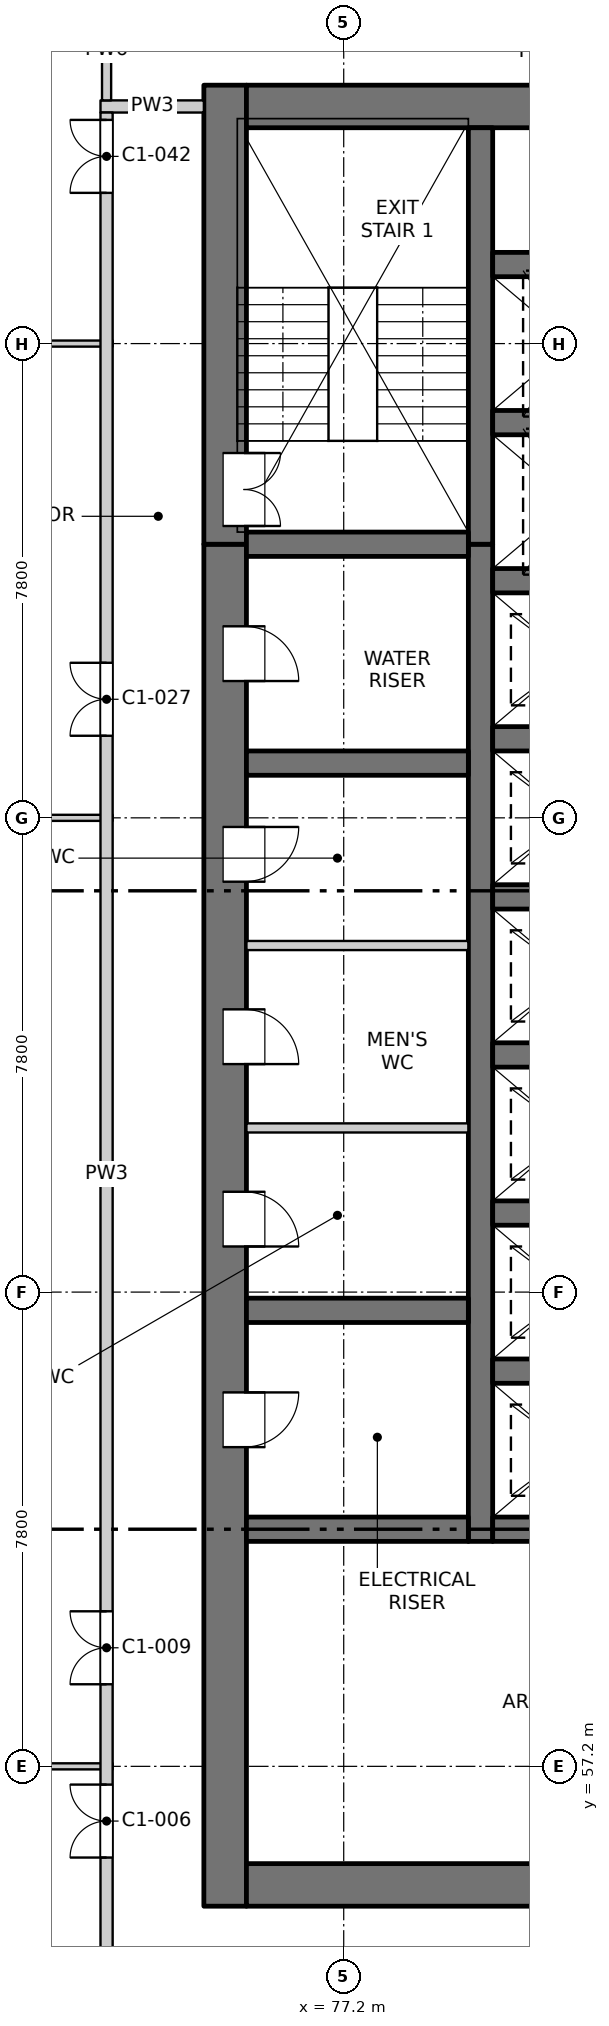
"""IFC4 building model, lengths in metres.
Left out: names, types, materials, properties, quantities, classifications, styles, units other than length and angle.
Written with IfcOpenShell. Run it as: python <this file> out.ifc"""

import sys

from ifc_helpers import new_model, si_unit, direction, frame, frame_2d, origin, place, context, subcontext, project, spatial, rectangle, extrude, element, fill, save


model = new_model("IFC4")
c1 = context("Model", 3, precision=1e-05, world=origin(), true_north=direction((0.0, 1.0)))
c2 = subcontext(c1, "Body", "Model", "MODEL_VIEW")
j1 = project(units=[si_unit("LENGTHUNIT", "METRE"), si_unit("PLANEANGLEUNIT", "RADIAN")], contexts=[c1])
p1 = place(None, origin())
s1 = spatial("IfcSite", under=j1, at=p1, CompositionType="ELEMENT")
p2 = place(p1, origin())
s2 = spatial("IfcBuilding", under=s1, at=p2, CompositionType="ELEMENT")
p3 = place(p2, frame((0.0, 0.0, 71.6)))
s3 = spatial("IfcBuildingStorey", under=s2, at=p3, CompositionType="ELEMENT", Elevation=71.6)
p4 = place(p3, frame((75.25, 54.9, -0.25), z_axis=(0.0, 0.0, 1.0), x_axis=(0.0, 1.0, 0.0)))
e1 = element("IfcWall", 1, at=p4, inside=s3, PredefinedType="SOLIDWALL", context=c2, shape_type="SweptSolid", body=[
    extrude(rectangle(XDim=22.4, YDim=0.7, at=frame_2d((11.2, 0.0))), origin(), (0.0, 0.0, 1.0), 3.4),
])
p5 = place(p4, frame((7.55, 0.0, 0.25)))
e2 = element("IfcOpeningElement", 2, at=p5, cuts=e1, PredefinedType="OPENING", context=c2, shape_type="SweptSolid", body=[
    extrude(rectangle(XDim=0.9, YDim=2.1, at=frame_2d((0.45, 1.05))), frame((0.0, 0.36, 0.0), z_axis=(0.0, -1.0, 0.0), x_axis=(1.0, 0.0, 0.0)), (0.0, 0.0, 1.0), 0.72),
])
p6 = place(p4, frame((10.85, 0.0, 0.25)))
e3 = element("IfcOpeningElement", 3, at=p6, cuts=e1, PredefinedType="OPENING", context=c2, shape_type="SweptSolid", body=[
    extrude(rectangle(XDim=0.9, YDim=2.1, at=frame_2d((0.45, 1.05))), frame((0.0, 0.36, 0.0), z_axis=(0.0, -1.0, 0.0), x_axis=(1.0, 0.0, 0.0)), (0.0, 0.0, 1.0), 0.72),
])
p7 = place(p4, frame((13.85, 0.0, 0.25)))
e4 = element("IfcOpeningElement", 4, at=p7, cuts=e1, PredefinedType="OPENING", context=c2, shape_type="SweptSolid", body=[
    extrude(rectangle(XDim=0.9, YDim=2.1, at=frame_2d((0.45, 1.05))), frame((0.0, 0.36, 0.0), z_axis=(0.0, -1.0, 0.0), x_axis=(1.0, 0.0, 0.0)), (0.0, 0.0, 1.0), 0.72),
])
p8 = place(p4, frame((16.85, 0.0, 0.25)))
e5 = element("IfcOpeningElement", 5, at=p8, cuts=e1, PredefinedType="OPENING", context=c2, shape_type="SweptSolid", body=[
    extrude(rectangle(XDim=0.9, YDim=2.1, at=frame_2d((0.45, 1.05))), frame((0.0, 0.36, 0.0), z_axis=(0.0, -1.0, 0.0), x_axis=(1.0, 0.0, 0.0)), (0.0, 0.0, 1.0), 0.72),
])
p9 = place(p4, frame((20.15, 0.0, 0.25)))
e6 = element("IfcOpeningElement", 6, at=p9, cuts=e1, PredefinedType="OPENING", context=c2, shape_type="SweptSolid", body=[
    extrude(rectangle(XDim=0.9, YDim=2.1, at=frame_2d((0.45, 1.05))), frame((0.0, 0.36, 0.0), z_axis=(0.0, -1.0, 0.0), x_axis=(1.0, 0.0, 0.0)), (0.0, 0.0, 1.0), 0.72),
])
p10 = place(p3, frame((75.25, 77.3, -0.25), z_axis=(0.0, 0.0, 1.0), x_axis=(0.0, 1.0, 0.0)))
e7 = element("IfcWall", 7, at=p10, inside=s3, PredefinedType="SOLIDWALL", context=c2, shape_type="SweptSolid", body=[
    extrude(rectangle(XDim=7.55, YDim=0.7, at=frame_2d((3.775, 0.0))), origin(), (0.0, 0.0, 1.0), 3.4),
])
p11 = place(p10, frame((0.3, 0.0, 0.25)))
e8 = element("IfcOpeningElement", 8, at=p11, cuts=e7, PredefinedType="OPENING", context=c2, shape_type="SweptSolid", body=[
    extrude(rectangle(XDim=1.2, YDim=2.1, at=frame_2d((0.6, 1.05))), frame((0.0, 0.36, 0.0), z_axis=(0.0, -1.0, 0.0), x_axis=(1.0, 0.0, 0.0)), (0.0, 0.0, 1.0), 0.72),
])
p12 = place(p3, frame((75.6, 55.25, -0.25), z_axis=(0.0, 0.0, 1.0), x_axis=(1.0, 0.0, 0.0)))
e9 = element("IfcWall", 9, at=p12, inside=s3, PredefinedType="SOLIDWALL", context=c2, shape_type="SweptSolid", body=[
    extrude(rectangle(XDim=18.8, YDim=0.7, at=frame_2d((9.4, 0.0))), origin(), (0.0, 0.0, 1.0), 3.4),
])
p13 = place(p12, frame((8.65, 0.0, 0.25)))
e10 = element("IfcOpeningElement", 10, at=p13, cuts=e9, PredefinedType="OPENING", context=c2, shape_type="SweptSolid", body=[
    extrude(rectangle(XDim=1.5, YDim=2.1, at=frame_2d((0.75, 1.05))), frame((0.0, 0.36, 0.0), z_axis=(0.0, -1.0, 0.0), x_axis=(1.0, 0.0, 0.0)), (0.0, 0.0, 1.0), 0.72),
])
p14 = place(p3, frame((75.6, 84.5, -0.25), z_axis=(0.0, 0.0, 1.0), x_axis=(1.0, 0.0, 0.0)))
e11 = element("IfcWall", 11, at=p14, inside=s3, PredefinedType="SOLIDWALL", context=c2, shape_type="SweptSolid", body=[
    extrude(rectangle(XDim=18.8, YDim=0.7, at=frame_2d((9.4, 0.0))), origin(), (0.0, 0.0, 1.0), 3.4),
])
p15 = place(p3, frame((79.45, 60.9, -0.25), z_axis=(0.0, 0.0, 1.0), x_axis=(0.0, 1.0, 0.0)))
e12 = element("IfcWall", 12, at=p15, inside=s3, PredefinedType="SOLIDWALL", context=c2, shape_type="SweptSolid", body=[
    extrude(rectangle(XDim=16.4, YDim=0.4, at=frame_2d((8.2, 0.0))), origin(), (0.0, 0.0, 1.0), 3.4),
])
p16 = place(p3, frame((79.45, 77.3, -0.25), z_axis=(0.0, 0.0, 1.0), x_axis=(0.0, 1.0, 0.0)))
e13 = element("IfcWall", 13, at=p16, inside=s3, PredefinedType="SOLIDWALL", context=c2, shape_type="SweptSolid", body=[
    extrude(rectangle(XDim=6.85, YDim=0.4, at=frame_2d((3.425, 0.0))), origin(), (0.0, 0.0, 1.0), 3.4),
])
for number, where, z_axis, x_axis in (
    (14, (79.65, 61.1, -0.25), (0.0, 0.0, 1.0), (1.0, 0.0, 0.0)),
    (15, (79.65, 63.7, -0.25), (0.0, 0.0, 1.0), (1.0, 0.0, 0.0)),
    (16, (79.65, 66.3, -0.25), (0.0, 0.0, 1.0), (1.0, 0.0, 0.0)),
    (17, (79.65, 68.9, -0.25), (0.0, 0.0, 1.0), (1.0, 0.0, 0.0)),
    (18, (79.65, 71.5, -0.25), (0.0, 0.0, 1.0), (1.0, 0.0, 0.0)),
    (19, (79.65, 74.1, -0.25), (0.0, 0.0, 1.0), (1.0, 0.0, 0.0)),
    (20, (79.65, 76.7, -0.25), (0.0, 0.0, 1.0), (1.0, 0.0, 0.0)),
    (21, (79.65, 79.3, -0.25), (0.0, 0.0, 1.0), (1.0, 0.0, 0.0)),
    (22, (79.65, 81.9, -0.25), (0.0, 0.0, 1.0), (1.0, 0.0, 0.0)),
):
    element("IfcWall", number, at=place(p3, frame(where, z_axis=z_axis, x_axis=x_axis)), inside=s3, PredefinedType="SOLIDWALL", context=c2, shape_type="SweptSolid", body=[
        extrude(rectangle(XDim=3.0, YDim=0.4, at=frame_2d((1.5, 0.0))), origin(), (0.0, 0.0, 1.0), 3.4),
    ])
for number, where, z_axis, x_axis in (
    (23, (75.6, 61.1, -0.25), (0.0, 0.0, 1.0), (1.0, 0.0, 0.0)),
    (24, (75.6, 64.7, -0.25), (0.0, 0.0, 1.0), (1.0, 0.0, 0.0)),
    (25, (75.6, 73.7, -0.25), (0.0, 0.0, 1.0), (1.0, 0.0, 0.0)),
    (26, (75.6, 77.3, -0.25), (0.0, 0.0, 1.0), (1.0, 0.0, 0.0)),
):
    element("IfcWall", number, at=place(p3, frame(where, z_axis=z_axis, x_axis=x_axis)), inside=s3, PredefinedType="SOLIDWALL", context=c2, shape_type="SweptSolid", body=[
        extrude(rectangle(XDim=3.65, YDim=0.4, at=frame_2d((1.825, 0.0))), origin(), (0.0, 0.0, 1.0), 3.4),
    ])
p17 = place(p3, frame((69.4, 57.2, 0.0), z_axis=(0.0, 0.0, 1.0), x_axis=(1.0, 0.0, 0.0)))
e27 = element("IfcWall", 27, at=p17, inside=s3, PredefinedType="PARTITIONING", context=c2, shape_type="SweptSolid", body=[
    extrude(rectangle(XDim=4.0, YDim=0.1, at=frame_2d((2.0, 0.0))), origin(), (0.0, 0.0, 1.0), 3.15),
])
for number, where, z_axis, x_axis in (
    (28, (75.6, 67.7, 0.0), (0.0, 0.0, 1.0), (1.0, 0.0, 0.0)),
    (29, (75.6, 70.7, 0.0), (0.0, 0.0, 1.0), (1.0, 0.0, 0.0)),
):
    element("IfcWall", number, at=place(p3, frame(where, z_axis=z_axis, x_axis=x_axis)), inside=s3, PredefinedType="PARTITIONING", context=c2, shape_type="SweptSolid", body=[
        extrude(rectangle(XDim=3.65, YDim=0.15, at=frame_2d((1.825, 0.0))), origin(), (0.0, 0.0, 1.0), 3.15),
    ])
for number, where, z_axis, x_axis in (
    (30, (69.4, 72.8, 0.0), (0.0, 0.0, 1.0), (1.0, 0.0, 0.0)),
    (31, (69.4, 80.6, 0.0), (0.0, 0.0, 1.0), (1.0, 0.0, 0.0)),
):
    element("IfcWall", number, at=place(p3, frame(where, z_axis=z_axis, x_axis=x_axis)), inside=s3, PredefinedType="PARTITIONING", context=c2, shape_type="SweptSolid", body=[
        extrude(rectangle(XDim=4.0, YDim=0.1, at=frame_2d((2.0, 0.0))), origin(), (0.0, 0.0, 1.0), 3.15),
    ])
p18 = place(p3, frame((73.2, 84.5, 0.0), z_axis=(0.0, 0.0, 1.0), x_axis=(1.0, 0.0, 0.0)))
e32 = element("IfcWall", 32, at=p18, inside=s3, PredefinedType="PARTITIONING", context=c2, shape_type="SweptSolid", body=[
    extrude(rectangle(XDim=1.7, YDim=0.2, at=frame_2d((0.85, 0.0))), origin(), (0.0, 0.0, 1.0), 3.15),
])
p19 = place(p3, frame((73.3, 49.5, 0.0), z_axis=(0.0, 0.0, 1.0), x_axis=(0.0, 1.0, 0.0)))
e33 = element("IfcWall", 33, at=p19, inside=s3, PredefinedType="PARTITIONING", context=c2, shape_type="SweptSolid", body=[
    extrude(rectangle(XDim=34.9, YDim=0.2, at=frame_2d((17.45, 0.0))), origin(), (0.0, 0.0, 1.0), 3.15),
])
p20 = place(p19, frame((6.2, 0.0, 0.0)))
e34 = element("IfcOpeningElement", 34, at=p20, cuts=e33, PredefinedType="OPENING", context=c2, shape_type="SweptSolid", body=[
    extrude(rectangle(XDim=1.2, YDim=2.1, at=frame_2d((0.6, 1.05))), frame((0.0, 0.11, 0.0), z_axis=(0.0, -1.0, 0.0), x_axis=(1.0, 0.0, 0.0)), (0.0, 0.0, 1.0), 0.22),
])
p21 = place(p19, frame((9.05, 0.0, 0.0)))
e35 = element("IfcOpeningElement", 35, at=p21, cuts=e33, PredefinedType="OPENING", context=c2, shape_type="SweptSolid", body=[
    extrude(rectangle(XDim=1.2, YDim=2.1, at=frame_2d((0.6, 1.05))), frame((0.0, 0.11, 0.0), z_axis=(0.0, -1.0, 0.0), x_axis=(1.0, 0.0, 0.0)), (0.0, 0.0, 1.0), 0.22),
])
p22 = place(p19, frame((24.65, 0.0, 0.0)))
e36 = element("IfcOpeningElement", 36, at=p22, cuts=e33, PredefinedType="OPENING", context=c2, shape_type="SweptSolid", body=[
    extrude(rectangle(XDim=1.2, YDim=2.1, at=frame_2d((0.6, 1.05))), frame((0.0, 0.11, 0.0), z_axis=(0.0, -1.0, 0.0), x_axis=(1.0, 0.0, 0.0)), (0.0, 0.0, 1.0), 0.22),
])
p23 = place(p19, frame((33.579, 0.0, 0.0)))
e37 = element("IfcOpeningElement", 37, at=p23, cuts=e33, PredefinedType="OPENING", context=c2, shape_type="SweptSolid", body=[
    extrude(rectangle(XDim=1.2, YDim=2.1, at=frame_2d((0.6, 1.05))), frame((0.0, 0.11, 0.0), z_axis=(0.0, -1.0, 0.0), x_axis=(1.0, 0.0, 0.0)), (0.0, 0.0, 1.0), 0.22),
])
p24 = place(p3, frame((73.3, 84.6, 0.0), z_axis=(0.0, 0.0, 1.0), x_axis=(0.0, 1.0, 0.0)))
e38 = element("IfcWall", 38, at=p24, inside=s3, PredefinedType="PARTITIONING", context=c2, shape_type="SweptSolid", body=[
    extrude(rectangle(XDim=3.665, YDim=0.15, at=frame_2d((1.833, 0.0))), origin(), (0.0, 0.0, 1.0), 3.15),
])
p25 = place(p24, frame((1.25, 0.0, 0.0)))
e39 = element("IfcOpeningElement", 39, at=p25, cuts=e38, PredefinedType="OPENING", context=c2, shape_type="SweptSolid", body=[
    extrude(rectangle(XDim=1.2, YDim=2.1, at=frame_2d((0.6, 1.05))), frame((0.0, 0.085, 0.0), z_axis=(0.0, -1.0, 0.0), x_axis=(1.0, 0.0, 0.0)), (0.0, 0.0, 1.0), 0.17),
])
p26 = place(p20, origin())
e40 = element("IfcDoor", 40, at=p26, inside=s3, OperationType="DOUBLE_DOOR_SINGLE_SWING", PredefinedType="DOOR", context=c2, shape_type="SweptSolid", body=[
    extrude(rectangle(XDim=1.2, YDim=2.1, at=frame_2d((0.6, 1.05))), frame((0.0, 0.025, 0.0), z_axis=(0.0, -1.0, 0.0), x_axis=(1.0, 0.0, 0.0)), (0.0, 0.0, 1.0), 0.05),
])
fill(e34, e40)
p27 = place(p21, origin())
e41 = element("IfcDoor", 41, at=p27, inside=s3, OperationType="DOUBLE_DOOR_SINGLE_SWING", PredefinedType="DOOR", context=c2, shape_type="SweptSolid", body=[
    extrude(rectangle(XDim=1.2, YDim=2.1, at=frame_2d((0.6, 1.05))), frame((0.0, 0.025, 0.0), z_axis=(0.0, -1.0, 0.0), x_axis=(1.0, 0.0, 0.0)), (0.0, 0.0, 1.0), 0.05),
])
fill(e35, e41)
p28 = place(p5, origin())
e42 = element("IfcDoor", 42, at=p28, inside=s3, OperationType="SINGLE_SWING_LEFT", PredefinedType="DOOR", context=c2, shape_type="SweptSolid", body=[
    extrude(rectangle(XDim=0.9, YDim=2.1, at=frame_2d((0.45, 1.05))), frame((0.0, -0.285, 0.0), z_axis=(0.0, -1.0, 0.0), x_axis=(1.0, 0.0, 0.0)), (0.0, 0.0, 1.0), 0.05),
])
fill(e2, e42)
p29 = place(p6, origin())
e43 = element("IfcDoor", 43, at=p29, inside=s3, OperationType="SINGLE_SWING_RIGHT", PredefinedType="DOOR", context=c2, shape_type="SweptSolid", body=[
    extrude(rectangle(XDim=0.9, YDim=2.1, at=frame_2d((0.45, 1.05))), frame((0.0, -0.285, 0.0), z_axis=(0.0, -1.0, 0.0), x_axis=(1.0, 0.0, 0.0)), (0.0, 0.0, 1.0), 0.05),
])
fill(e3, e43)
p30 = place(p7, origin())
e44 = element("IfcDoor", 44, at=p30, inside=s3, OperationType="SINGLE_SWING_RIGHT", PredefinedType="DOOR", context=c2, shape_type="SweptSolid", body=[
    extrude(rectangle(XDim=0.9, YDim=2.1, at=frame_2d((0.45, 1.05))), frame((0.0, -0.285, 0.0), z_axis=(0.0, -1.0, 0.0), x_axis=(1.0, 0.0, 0.0)), (0.0, 0.0, 1.0), 0.05),
])
fill(e4, e44)
p31 = place(p8, origin())
e45 = element("IfcDoor", 45, at=p31, inside=s3, OperationType="SINGLE_SWING_LEFT", PredefinedType="DOOR", context=c2, shape_type="SweptSolid", body=[
    extrude(rectangle(XDim=0.9, YDim=2.1, at=frame_2d((0.45, 1.05))), frame((0.0, -0.285, 0.0), z_axis=(0.0, -1.0, 0.0), x_axis=(1.0, 0.0, 0.0)), (0.0, 0.0, 1.0), 0.05),
])
fill(e5, e45)
p32 = place(p22, origin())
e46 = element("IfcDoor", 46, at=p32, inside=s3, OperationType="DOUBLE_DOOR_SINGLE_SWING", PredefinedType="DOOR", context=c2, shape_type="SweptSolid", body=[
    extrude(rectangle(XDim=1.2, YDim=2.1, at=frame_2d((0.6, 1.05))), frame((0.0, 0.025, 0.0), z_axis=(0.0, -1.0, 0.0), x_axis=(1.0, 0.0, 0.0)), (0.0, 0.0, 1.0), 0.05),
])
fill(e36, e46)
p33 = place(p9, origin())
e47 = element("IfcDoor", 47, at=p33, inside=s3, OperationType="SINGLE_SWING_RIGHT", PredefinedType="DOOR", context=c2, shape_type="SweptSolid", body=[
    extrude(rectangle(XDim=0.9, YDim=2.1, at=frame_2d((0.45, 1.05))), frame((0.0, -0.285, 0.0), z_axis=(0.0, -1.0, 0.0), x_axis=(1.0, 0.0, 0.0)), (0.0, 0.0, 1.0), 0.05),
])
fill(e6, e47)
p34 = place(p11, origin())
e48 = element("IfcDoor", 48, at=p34, inside=s3, OperationType="DOUBLE_DOOR_SINGLE_SWING", PredefinedType="DOOR", context=c2, shape_type="SweptSolid", body=[
    extrude(rectangle(XDim=1.2, YDim=2.1, at=frame_2d((0.6, 1.05))), frame((0.0, -0.285, 0.0), z_axis=(0.0, -1.0, 0.0), x_axis=(1.0, 0.0, 0.0)), (0.0, 0.0, 1.0), 0.05),
])
fill(e8, e48)
p35 = place(p23, origin())
e49 = element("IfcDoor", 49, at=p35, inside=s3, OperationType="DOUBLE_DOOR_SINGLE_SWING", PredefinedType="DOOR", context=c2, shape_type="SweptSolid", body=[
    extrude(rectangle(XDim=1.2, YDim=2.1, at=frame_2d((0.6, 1.05))), frame((0.0, 0.025, 0.0), z_axis=(0.0, -1.0, 0.0), x_axis=(1.0, 0.0, 0.0)), (0.0, 0.0, 1.0), 0.05),
])
fill(e37, e49)
save(model, sys.argv[1])
